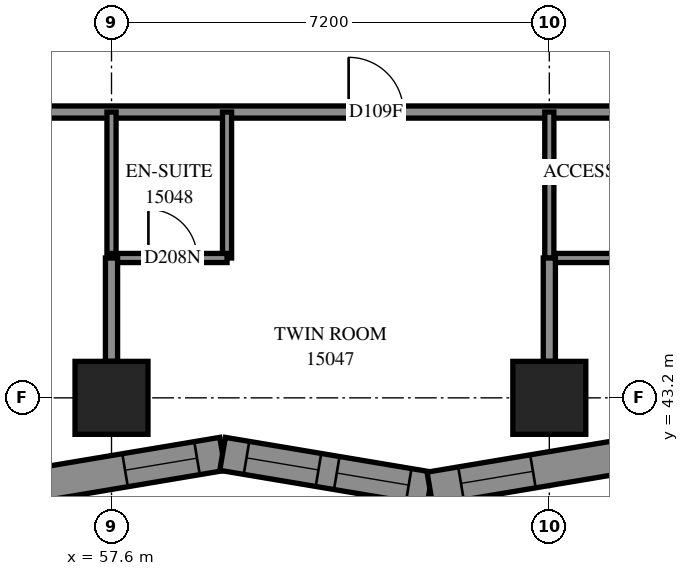
"""IFC4 building model, lengths in metres.
Left out: names, types, materials, properties, quantities, classifications, styles, units other than length and angle.
Written with IfcOpenShell. Run it as: python <this file> out.ifc"""

import sys

from ifc_helpers import new_model, si_unit, direction, frame, frame_2d, origin, origin_2d, place, context, subcontext, project, spatial, polyline, rectangle, outline, extrude, element, fill, save


model = new_model("IFC4")
c1 = context("Model", 3, precision=1e-05, world=origin(), true_north=direction((0.0, 1.0)))
c2 = subcontext(c1, "Body", "Model", "MODEL_VIEW")
j1 = project(units=[si_unit("LENGTHUNIT", "METRE"), si_unit("PLANEANGLEUNIT", "RADIAN")], contexts=[c1])
p1 = place(None, origin())
s1 = spatial("IfcSite", under=j1, at=p1, CompositionType="ELEMENT")
p2 = place(p1, origin())
s2 = spatial("IfcBuilding", under=s1, at=p2, CompositionType="ELEMENT")
p3 = place(p2, frame((0.0, 0.0, 57.6)))
s3 = spatial("IfcBuildingStorey", under=s2, at=p3, CompositionType="ELEMENT", Elevation=57.6)
for number, where, z_axis, x_axis in (
    (1, (57.6, 43.2, 0.0), (0.0, 0.0, 1.0), (1.0, 0.0, 0.0)),
    (2, (64.8, 43.2, 0.0), (0.0, 0.0, 1.0), (1.0, 0.0, 0.0)),
):
    element("IfcColumn", number, at=place(p3, frame(where, z_axis=z_axis, x_axis=x_axis)), inside=s3, PredefinedType="COLUMN", context=c2, shape_type="SweptSolid", body=[
        extrude(rectangle(XDim=1.2, YDim=1.2, at=origin_2d()), origin(), (0.0, 0.0, 1.0), 3.1),
    ])
p4 = place(p3, frame((56.018, 41.707, 0.0), z_axis=(0.0, 0.0, 1.0), x_axis=(0.9862119159, 0.1654873316, 0.0)))
e3 = element("IfcWall", 3, at=p4, inside=s3, PredefinedType="SOLIDWALL", context=c2, shape_type="SweptSolid", body=[
    extrude(outline(polyline([(-0.046, -0.275), (3.41, -0.275), (3.503, 0.275), (0.046, 0.275), (-0.046, -0.275)])), origin(), (0.0, 0.0, 1.0), 3.1),
])
p5 = place(p4, frame((1.831, 0.0, 0.5)))
e4 = element("IfcOpeningElement", 4, at=p5, cuts=e3, PredefinedType="OPENING", context=c2, shape_type="SweptSolid", body=[
    extrude(rectangle(XDim=1.2, YDim=2.45, at=frame_2d((0.6, 1.225))), frame((0.0, 0.285, 0.0), z_axis=(0.0, -1.0, 0.0), x_axis=(1.0, 0.0, 0.0)), (0.0, 0.0, 1.0), 0.57),
])
p6 = place(p3, frame((59.426, 42.279, 0.0), z_axis=(0.0, 0.0, 1.0), x_axis=(0.9862119159, -0.1654873316, 0.0)))
e5 = element("IfcWall", 5, at=p6, inside=s3, PredefinedType="SOLIDWALL", context=c2, shape_type="SweptSolid", body=[
    extrude(outline(polyline([(0.046, -0.275), (3.503, -0.275), (3.41, 0.275), (-0.046, 0.275), (0.046, -0.275)])), origin(), (0.0, 0.0, 1.0), 3.1),
])
p7 = place(p6, frame((0.399, 0.0, 0.5)))
e6 = element("IfcOpeningElement", 6, at=p7, cuts=e5, PredefinedType="OPENING", context=c2, shape_type="SweptSolid", body=[
    extrude(rectangle(XDim=1.2, YDim=2.45, at=frame_2d((0.6, 1.225))), frame((0.0, 0.285, 0.0), z_axis=(0.0, -1.0, 0.0), x_axis=(1.0, 0.0, 0.0)), (0.0, 0.0, 1.0), 0.57),
])
p8 = place(p6, frame((1.904, 0.0, 0.5)))
e7 = element("IfcOpeningElement", 7, at=p8, cuts=e5, PredefinedType="OPENING", context=c2, shape_type="SweptSolid", body=[
    extrude(rectangle(XDim=1.2, YDim=2.45, at=frame_2d((0.6, 1.225))), frame((0.0, 0.285, 0.0), z_axis=(0.0, -1.0, 0.0), x_axis=(1.0, 0.0, 0.0)), (0.0, 0.0, 1.0), 0.57),
])
p9 = place(p3, frame((62.835, 41.707, 0.0), z_axis=(0.0, 0.0, 1.0), x_axis=(0.9862119159, 0.1654873316, 0.0)))
e8 = element("IfcWall", 8, at=p9, inside=s3, PredefinedType="SOLIDWALL", context=c2, shape_type="SweptSolid", body=[
    extrude(outline(polyline([(-0.046, -0.275), (3.41, -0.275), (3.503, 0.275), (0.046, 0.275), (-0.046, -0.275)])), origin(), (0.0, 0.0, 1.0), 3.1),
])
p10 = place(p9, frame((0.519, 0.0, 0.5)))
e9 = element("IfcOpeningElement", 9, at=p10, cuts=e8, PredefinedType="OPENING", context=c2, shape_type="SweptSolid", body=[
    extrude(rectangle(XDim=1.2, YDim=2.45, at=frame_2d((0.6, 1.225))), frame((0.0, 0.285, 0.0), z_axis=(0.0, -1.0, 0.0), x_axis=(1.0, 0.0, 0.0)), (0.0, 0.0, 1.0), 0.57),
])
p11 = place(p3, frame((55.1, 47.9, 0.0), z_axis=(0.0, 0.0, 1.0), x_axis=(1.0, 0.0, 0.0)))
e10 = element("IfcWall", 10, at=p11, inside=s3, PredefinedType="PARTITIONING", context=c2, shape_type="SweptSolid", body=[
    extrude(rectangle(XDim=19.208, YDim=0.2, at=frame_2d((9.604, 0.0))), origin(), (0.0, 0.0, 1.0), 3.1),
])
p12 = place(p11, frame((6.399, 0.0, 0.0)))
e11 = element("IfcOpeningElement", 11, at=p12, cuts=e10, PredefinedType="OPENING", context=c2, shape_type="SweptSolid", body=[
    extrude(rectangle(XDim=0.9, YDim=2.1, at=frame_2d((0.45, 1.05))), frame((0.0, 0.11, 0.0), z_axis=(0.0, -1.0, 0.0), x_axis=(1.0, 0.0, 0.0)), (0.0, 0.0, 1.0), 0.22),
])
p13 = place(p11, frame((13.561, 0.0, 0.0)))
e12 = element("IfcOpeningElement", 12, at=p13, cuts=e10, PredefinedType="OPENING", context=c2, shape_type="SweptSolid", body=[
    extrude(rectangle(XDim=0.9, YDim=2.1, at=frame_2d((0.45, 1.05))), frame((0.0, 0.11, 0.0), z_axis=(0.0, -1.0, 0.0), x_axis=(1.0, 0.0, 0.0)), (0.0, 0.0, 1.0), 0.22),
])
p14 = place(p3, frame((64.8, 45.5, 0.0), z_axis=(0.0, 0.0, 1.0), x_axis=(1.0, 0.0, 0.0)))
e13 = element("IfcWall", 13, at=p14, inside=s3, PredefinedType="PARTITIONING", context=c2, shape_type="SweptSolid", body=[
    extrude(rectangle(XDim=3.2, YDim=0.15, at=frame_2d((1.6, 0.0))), origin(), (0.0, 0.0, 1.0), 3.1),
])
p15 = place(p14, frame((1.196, 0.0, 0.0)))
e14 = element("IfcOpeningElement", 14, at=p15, cuts=e13, PredefinedType="OPENING", context=c2, shape_type="SweptSolid", body=[
    extrude(rectangle(XDim=0.8, YDim=2.1, at=frame_2d((0.4, 1.05))), frame((0.0, 0.085, 0.0), z_axis=(0.0, -1.0, 0.0), x_axis=(1.0, 0.0, 0.0)), (0.0, 0.0, 1.0), 0.17),
])
for number, where, z_axis, x_axis in (
    (15, (59.5, 45.5, 0.0), (0.0, 0.0, 1.0), (0.0, 1.0, 0.0)),
    (16, (57.6, 45.5, 0.0), (0.0, 0.0, 1.0), (0.0, 1.0, 0.0)),
    (17, (64.8, 45.5, 0.0), (0.0, 0.0, 1.0), (0.0, 1.0, 0.0)),
):
    element("IfcWall", number, at=place(p3, frame(where, z_axis=z_axis, x_axis=x_axis)), inside=s3, PredefinedType="PARTITIONING", context=c2, shape_type="SweptSolid", body=[
        extrude(rectangle(XDim=2.4, YDim=0.15, at=frame_2d((1.2, 0.0))), origin(), (0.0, 0.0, 1.0), 3.1),
    ])
p16 = place(p3, frame((57.6, 45.5, 0.0), z_axis=(0.0, 0.0, 1.0), x_axis=(1.0, 0.0, 0.0)))
e18 = element("IfcWall", 18, at=p16, inside=s3, PredefinedType="PARTITIONING", context=c2, shape_type="SweptSolid", body=[
    extrude(rectangle(XDim=1.9, YDim=0.15, at=frame_2d((0.95, 0.0))), origin(), (0.0, 0.0, 1.0), 3.1),
])
p17 = place(p16, frame((0.607, 0.0, 0.0)))
e19 = element("IfcOpeningElement", 19, at=p17, cuts=e18, PredefinedType="OPENING", context=c2, shape_type="SweptSolid", body=[
    extrude(rectangle(XDim=0.8, YDim=2.1, at=frame_2d((0.4, 1.05))), frame((0.0, 0.085, 0.0), z_axis=(0.0, -1.0, 0.0), x_axis=(1.0, 0.0, 0.0)), (0.0, 0.0, 1.0), 0.17),
])
for number, where, z_axis, x_axis in (
    (20, (57.6, 43.8, 0.0), (0.0, 0.0, 1.0), (0.0, 1.0, 0.0)),
    (21, (64.8, 43.8, 0.0), (0.0, 0.0, 1.0), (0.0, 1.0, 0.0)),
):
    element("IfcWall", number, at=place(p3, frame(where, z_axis=z_axis, x_axis=x_axis)), inside=s3, PredefinedType="PARTITIONING", context=c2, shape_type="SweptSolid", body=[
        extrude(rectangle(XDim=1.7, YDim=0.2, at=frame_2d((0.85, 0.0))), origin(), (0.0, 0.0, 1.0), 3.1),
    ])
p18 = place(p5, origin())
e22 = element("IfcWindow", 22, at=p18, inside=s3, PartitioningType="SINGLE_PANEL", PredefinedType="WINDOW", context=c2, shape_type="SweptSolid", body=[
    extrude(rectangle(XDim=1.2, YDim=2.45, at=frame_2d((0.6, 1.225))), frame((0.0, 0.155, 0.0), z_axis=(0.0, -1.0, 0.0), x_axis=(1.0, 0.0, 0.0)), (0.0, 0.0, 1.0), 0.06),
])
fill(e4, e22)
p19 = place(p7, origin())
e23 = element("IfcWindow", 23, at=p19, inside=s3, PartitioningType="SINGLE_PANEL", PredefinedType="WINDOW", context=c2, shape_type="SweptSolid", body=[
    extrude(rectangle(XDim=1.2, YDim=2.45, at=frame_2d((0.6, 1.225))), frame((0.0, 0.155, 0.0), z_axis=(0.0, -1.0, 0.0), x_axis=(1.0, 0.0, 0.0)), (0.0, 0.0, 1.0), 0.06),
])
fill(e6, e23)
p20 = place(p8, origin())
e24 = element("IfcWindow", 24, at=p20, inside=s3, PartitioningType="SINGLE_PANEL", PredefinedType="WINDOW", context=c2, shape_type="SweptSolid", body=[
    extrude(rectangle(XDim=1.2, YDim=2.45, at=frame_2d((0.6, 1.225))), frame((0.0, 0.155, 0.0), z_axis=(0.0, -1.0, 0.0), x_axis=(1.0, 0.0, 0.0)), (0.0, 0.0, 1.0), 0.06),
])
fill(e7, e24)
p21 = place(p10, origin())
e25 = element("IfcWindow", 25, at=p21, inside=s3, PartitioningType="SINGLE_PANEL", PredefinedType="WINDOW", context=c2, shape_type="SweptSolid", body=[
    extrude(rectangle(XDim=1.2, YDim=2.45, at=frame_2d((0.6, 1.225))), frame((0.0, 0.155, 0.0), z_axis=(0.0, -1.0, 0.0), x_axis=(1.0, 0.0, 0.0)), (0.0, 0.0, 1.0), 0.06),
])
fill(e9, e25)
p22 = place(p12, origin())
e26 = element("IfcDoor", 26, at=p22, inside=s3, OperationType="SINGLE_SWING_LEFT", PredefinedType="DOOR", context=c2, shape_type="SweptSolid", body=[
    extrude(rectangle(XDim=0.9, YDim=2.1, at=frame_2d((0.45, 1.05))), frame((0.0, 0.025, 0.0), z_axis=(0.0, -1.0, 0.0), x_axis=(1.0, 0.0, 0.0)), (0.0, 0.0, 1.0), 0.05),
])
fill(e11, e26)
p23 = place(p17, origin())
e27 = element("IfcDoor", 27, at=p23, inside=s3, OperationType="SINGLE_SWING_RIGHT", PredefinedType="DOOR", context=c2, shape_type="SweptSolid", body=[
    extrude(rectangle(XDim=0.8, YDim=2.1, at=frame_2d((0.4, 1.05))), frame((0.0, 0.025, 0.0), z_axis=(0.0, -1.0, 0.0), x_axis=(1.0, 0.0, 0.0)), (0.0, 0.0, 1.0), 0.05),
])
fill(e19, e27)
save(model, sys.argv[1])
